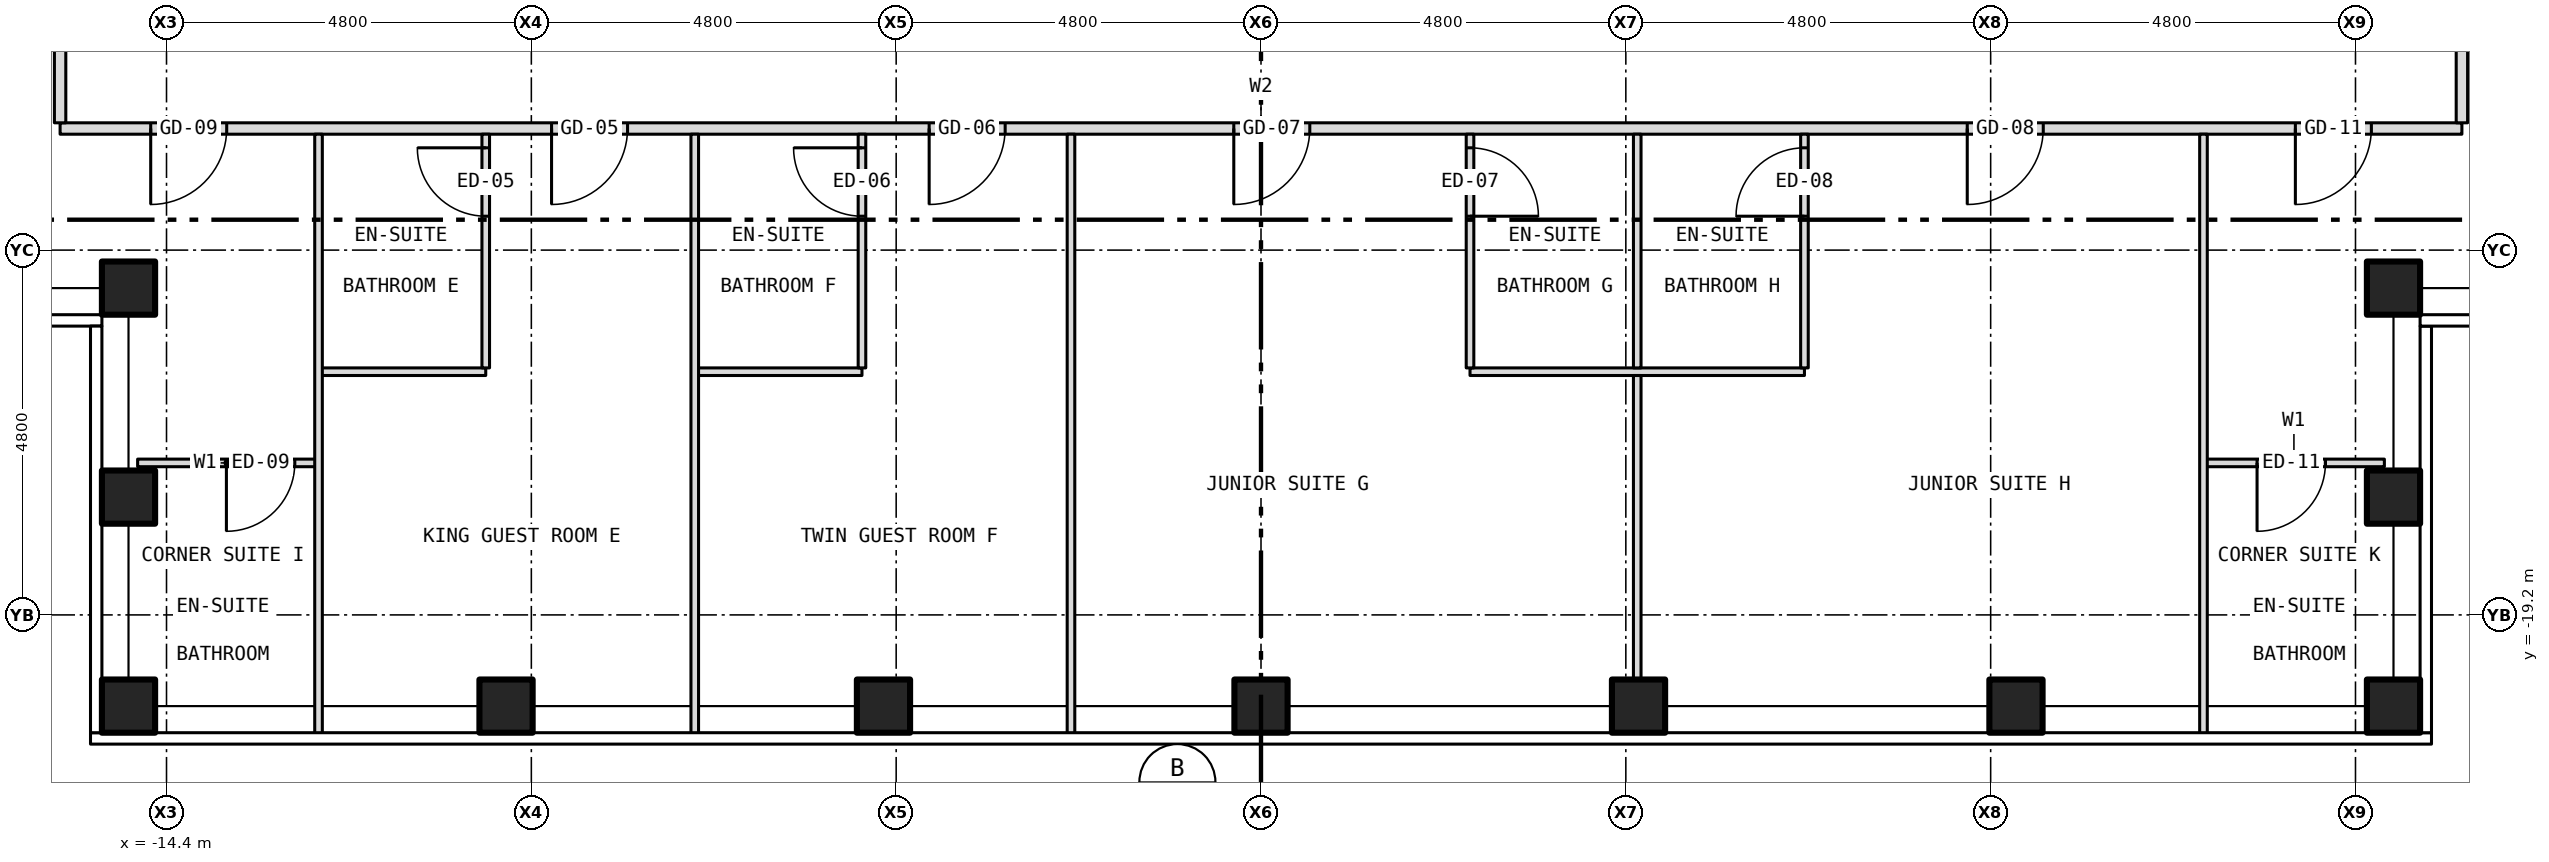
"""IFC4 building model, lengths in metres.
Left out: names, types, materials, properties, quantities, classifications, styles, units other than length and angle.
Written with IfcOpenShell. Run it as: python <this file> out.ifc"""

import sys

from ifc_helpers import new_model, si_unit, direction, frame, frame_2d, origin, origin_2d, place, context, subcontext, project, spatial, rectangle, hollow_rectangle, extrude, element, fill, save


model = new_model("IFC4")
c1 = context("Model", 3, precision=1e-05, world=origin(), true_north=direction((0.0, 1.0)))
c2 = subcontext(c1, "Body", "Model", "MODEL_VIEW")
j1 = project(units=[si_unit("LENGTHUNIT", "METRE"), si_unit("PLANEANGLEUNIT", "RADIAN")], contexts=[c1])
p1 = place(None, origin())
s1 = spatial("IfcSite", under=j1, at=p1, CompositionType="ELEMENT")
p2 = place(p1, origin())
s2 = spatial("IfcBuilding", under=s1, at=p2, CompositionType="ELEMENT")
p3 = place(p2, frame((0.0, 0.0, 201.5)))
s3 = spatial("IfcBuildingStorey", under=s2, at=p3, CompositionType="ELEMENT", Elevation=201.5)
for number, where, z_axis, x_axis in (
    (1, (-14.9, -20.4, -0.15), (0.0, 0.0, 1.0), (1.0, 0.0, 0.0)),
    (2, (-9.933, -20.4, -0.15), (0.0, 0.0, 1.0), (1.0, 0.0, 0.0)),
    (3, (-4.967, -20.4, -0.15), (0.0, 0.0, 1.0), (1.0, 0.0, 0.0)),
    (4, (0.0, -20.4, -0.15), (0.0, 0.0, 1.0), (1.0, 0.0, 0.0)),
    (5, (4.967, -20.4, -0.15), (0.0, 0.0, 1.0), (1.0, 0.0, 0.0)),
    (6, (9.933, -20.4, -0.15), (0.0, 0.0, 1.0), (1.0, 0.0, 0.0)),
    (7, (14.9, -20.4, -0.15), (0.0, 0.0, 1.0), (1.0, 0.0, 0.0)),
    (8, (-14.9, -14.9, -0.15), (0.0, 0.0, 1.0), (1.0, 0.0, 0.0)),
    (9, (-14.9, -17.65, -0.15), (0.0, 0.0, 1.0), (1.0, 0.0, 0.0)),
    (10, (14.9, -14.9, -0.15), (0.0, 0.0, 1.0), (1.0, 0.0, 0.0)),
    (11, (14.9, -17.65, -0.15), (0.0, 0.0, 1.0), (1.0, 0.0, 0.0)),
):
    element("IfcColumn", number, at=place(p3, frame(where, z_axis=z_axis, x_axis=x_axis)), inside=s3, PredefinedType="COLUMN", context=c2, shape_type="SweptSolid", body=[
        extrude(hollow_rectangle(XDim=0.7, YDim=0.7, WallThickness=0.04, at=origin_2d()), origin(), (0.0, 0.0, 1.0), 3.5),
    ])
p4 = place(p3, frame((-14.78, -17.2, 0.0), z_axis=(0.0, 0.0, 1.0), x_axis=(1.0, 0.0, 0.0)))
e12 = element("IfcWall", 12, at=p4, inside=s3, PredefinedType="PARTITIONING", context=c2, shape_type="SweptSolid", body=[
    extrude(rectangle(XDim=2.38, YDim=0.1, at=frame_2d((1.19, 0.0))), origin(), (0.0, 0.0, 1.0), 3.35),
])
p5 = place(p4, frame((1.168, 0.0, 0.0)))
e13 = element("IfcOpeningElement", 13, at=p5, cuts=e12, PredefinedType="OPENING", context=c2, shape_type="SweptSolid", body=[
    extrude(rectangle(XDim=0.9, YDim=2.1, at=frame_2d((0.45, 1.05))), frame((0.0, 0.062, 0.0), z_axis=(0.0, -1.0, 0.0), x_axis=(1.0, 0.0, 0.0)), (0.0, 0.0, 1.0), 0.124),
])
p6 = place(p3, frame((12.4, -17.2, 0.0), z_axis=(0.0, 0.0, 1.0), x_axis=(1.0, 0.0, 0.0)))
e14 = element("IfcWall", 14, at=p6, inside=s3, PredefinedType="PARTITIONING", context=c2, shape_type="SweptSolid", body=[
    extrude(rectangle(XDim=2.38, YDim=0.1, at=frame_2d((1.19, 0.0))), origin(), (0.0, 0.0, 1.0), 3.35),
])
p7 = place(p6, frame((0.705, 0.0, 0.0)))
e15 = element("IfcOpeningElement", 15, at=p7, cuts=e14, PredefinedType="OPENING", context=c2, shape_type="SweptSolid", body=[
    extrude(rectangle(XDim=0.9, YDim=2.1, at=frame_2d((0.45, 1.05))), frame((0.0, 0.062, 0.0), z_axis=(0.0, -1.0, 0.0), x_axis=(1.0, 0.0, 0.0)), (0.0, 0.0, 1.0), 0.124),
])
for number, where, z_axis, x_axis in (
    (16, (-12.4, -16.0, 0.0), (0.0, 0.0, 1.0), (1.0, 0.0, 0.0)),
    (17, (-7.45, -16.0, 0.0), (0.0, 0.0, 1.0), (1.0, 0.0, 0.0)),
):
    element("IfcWall", number, at=place(p3, frame(where, z_axis=z_axis, x_axis=x_axis)), inside=s3, PredefinedType="PARTITIONING", context=c2, shape_type="SweptSolid", body=[
        extrude(rectangle(XDim=2.2, YDim=0.1, at=frame_2d((1.1, 0.0))), origin(), (0.0, 0.0, 1.0), 3.35),
    ])
p8 = place(p3, frame((2.75, -16.0, 0.0), z_axis=(0.0, 0.0, 1.0), x_axis=(1.0, 0.0, 0.0)))
e18 = element("IfcWall", 18, at=p8, inside=s3, PredefinedType="PARTITIONING", context=c2, shape_type="SweptSolid", body=[
    extrude(rectangle(XDim=4.4, YDim=0.1, at=frame_2d((2.2, 0.0))), origin(), (0.0, 0.0, 1.0), 3.35),
])
p9 = place(p3, frame((-15.8, -12.8, 0.0), z_axis=(0.0, 0.0, 1.0), x_axis=(1.0, 0.0, 0.0)))
e19 = element("IfcWall", 19, at=p9, inside=s3, PredefinedType="PARTITIONING", context=c2, shape_type="SweptSolid", body=[
    extrude(rectangle(XDim=31.6, YDim=0.15, at=frame_2d((15.8, 0.0))), origin(), (0.0, 0.0, 1.0), 3.35),
])
p10 = place(p9, frame((6.466, 0.0, 0.0)))
e20 = element("IfcOpeningElement", 20, at=p10, cuts=e19, PredefinedType="OPENING", context=c2, shape_type="SweptSolid", body=[
    extrude(rectangle(XDim=1.0, YDim=2.1, at=frame_2d((0.5, 1.05))), frame((0.0, 0.087, 0.0), z_axis=(0.0, -1.0, 0.0), x_axis=(1.0, 0.0, 0.0)), (0.0, 0.0, 1.0), 0.174),
])
p11 = place(p9, frame((11.434, 0.0, 0.0)))
e21 = element("IfcOpeningElement", 21, at=p11, cuts=e19, PredefinedType="OPENING", context=c2, shape_type="SweptSolid", body=[
    extrude(rectangle(XDim=1.0, YDim=2.1, at=frame_2d((0.5, 1.05))), frame((0.0, 0.087, 0.0), z_axis=(0.0, -1.0, 0.0), x_axis=(1.0, 0.0, 0.0)), (0.0, 0.0, 1.0), 0.174),
])
p12 = place(p9, frame((15.442, 0.0, 0.0)))
e22 = element("IfcOpeningElement", 22, at=p12, cuts=e19, PredefinedType="OPENING", context=c2, shape_type="SweptSolid", body=[
    extrude(rectangle(XDim=1.0, YDim=2.1, at=frame_2d((0.5, 1.05))), frame((0.0, 0.087, 0.0), z_axis=(0.0, -1.0, 0.0), x_axis=(1.0, 0.0, 0.0)), (0.0, 0.0, 1.0), 0.174),
])
p13 = place(p9, frame((25.092, 0.0, 0.0)))
e23 = element("IfcOpeningElement", 23, at=p13, cuts=e19, PredefinedType="OPENING", context=c2, shape_type="SweptSolid", body=[
    extrude(rectangle(XDim=1.0, YDim=2.1, at=frame_2d((0.5, 1.05))), frame((0.0, 0.087, 0.0), z_axis=(0.0, -1.0, 0.0), x_axis=(1.0, 0.0, 0.0)), (0.0, 0.0, 1.0), 0.174),
])
p14 = place(p9, frame((1.192, 0.0, 0.0)))
e24 = element("IfcOpeningElement", 24, at=p14, cuts=e19, PredefinedType="OPENING", context=c2, shape_type="SweptSolid", body=[
    extrude(rectangle(XDim=1.0, YDim=2.1, at=frame_2d((0.5, 1.05))), frame((0.0, 0.087, 0.0), z_axis=(0.0, -1.0, 0.0), x_axis=(1.0, 0.0, 0.0)), (0.0, 0.0, 1.0), 0.174),
])
p15 = place(p9, frame((29.409, 0.0, 0.0)))
e25 = element("IfcOpeningElement", 25, at=p15, cuts=e19, PredefinedType="OPENING", context=c2, shape_type="SweptSolid", body=[
    extrude(rectangle(XDim=1.0, YDim=2.1, at=frame_2d((0.5, 1.05))), frame((0.0, 0.087, 0.0), z_axis=(0.0, -1.0, 0.0), x_axis=(1.0, 0.0, 0.0)), (0.0, 0.0, 1.0), 0.174),
])
p16 = place(p3, frame((-15.8, -12.725, 0.0), z_axis=(0.0, 0.0, 1.0), x_axis=(0.0, 1.0, 0.0)))
e26 = element("IfcWall", 26, at=p16, inside=s3, PredefinedType="PARTITIONING", context=c2, shape_type="SweptSolid", body=[
    extrude(rectangle(XDim=1.805, YDim=0.15, at=frame_2d((0.903, 0.0))), origin(), (0.0, 0.0, 1.0), 3.35),
])
p17 = place(p3, frame((-12.4, -20.78, 0.0), z_axis=(0.0, 0.0, 1.0), x_axis=(0.0, 1.0, 0.0)))
e27 = element("IfcWall", 27, at=p17, inside=s3, PredefinedType="PARTITIONING", context=c2, shape_type="SweptSolid", body=[
    extrude(rectangle(XDim=7.905, YDim=0.1, at=frame_2d((3.953, 0.0))), origin(), (0.0, 0.0, 1.0), 3.35),
])
p18 = place(p3, frame((-10.2, -15.95, 0.0), z_axis=(0.0, 0.0, 1.0), x_axis=(0.0, 1.0, 0.0)))
e28 = element("IfcWall", 28, at=p18, inside=s3, PredefinedType="PARTITIONING", context=c2, shape_type="SweptSolid", body=[
    extrude(rectangle(XDim=3.075, YDim=0.1, at=frame_2d((1.538, 0.0))), origin(), (0.0, 0.0, 1.0), 3.35),
])
p19 = place(p18, frame((1.996, 0.0, 0.0)))
e29 = element("IfcOpeningElement", 29, at=p19, cuts=e28, PredefinedType="OPENING", context=c2, shape_type="SweptSolid", body=[
    extrude(rectangle(XDim=0.9, YDim=2.1, at=frame_2d((0.45, 1.05))), frame((0.0, 0.062, 0.0), z_axis=(0.0, -1.0, 0.0), x_axis=(1.0, 0.0, 0.0)), (0.0, 0.0, 1.0), 0.124),
])
p20 = place(p3, frame((-7.45, -20.78, 0.0), z_axis=(0.0, 0.0, 1.0), x_axis=(0.0, 1.0, 0.0)))
e30 = element("IfcWall", 30, at=p20, inside=s3, PredefinedType="PARTITIONING", context=c2, shape_type="SweptSolid", body=[
    extrude(rectangle(XDim=7.905, YDim=0.1, at=frame_2d((3.953, 0.0))), origin(), (0.0, 0.0, 1.0), 3.35),
])
p21 = place(p3, frame((-5.25, -15.95, 0.0), z_axis=(0.0, 0.0, 1.0), x_axis=(0.0, 1.0, 0.0)))
e31 = element("IfcWall", 31, at=p21, inside=s3, PredefinedType="PARTITIONING", context=c2, shape_type="SweptSolid", body=[
    extrude(rectangle(XDim=3.075, YDim=0.1, at=frame_2d((1.538, 0.0))), origin(), (0.0, 0.0, 1.0), 3.35),
])
p22 = place(p21, frame((1.996, 0.0, 0.0)))
e32 = element("IfcOpeningElement", 32, at=p22, cuts=e31, PredefinedType="OPENING", context=c2, shape_type="SweptSolid", body=[
    extrude(rectangle(XDim=0.9, YDim=2.1, at=frame_2d((0.45, 1.05))), frame((0.0, 0.062, 0.0), z_axis=(0.0, -1.0, 0.0), x_axis=(1.0, 0.0, 0.0)), (0.0, 0.0, 1.0), 0.124),
])
p23 = place(p3, frame((-2.5, -20.78, 0.0), z_axis=(0.0, 0.0, 1.0), x_axis=(0.0, 1.0, 0.0)))
e33 = element("IfcWall", 33, at=p23, inside=s3, PredefinedType="PARTITIONING", context=c2, shape_type="SweptSolid", body=[
    extrude(rectangle(XDim=7.905, YDim=0.1, at=frame_2d((3.953, 0.0))), origin(), (0.0, 0.0, 1.0), 3.35),
])
p24 = place(p3, frame((2.75, -15.95, 0.0), z_axis=(0.0, 0.0, 1.0), x_axis=(0.0, 1.0, 0.0)))
e34 = element("IfcWall", 34, at=p24, inside=s3, PredefinedType="PARTITIONING", context=c2, shape_type="SweptSolid", body=[
    extrude(rectangle(XDim=3.075, YDim=0.1, at=frame_2d((1.538, 0.0))), origin(), (0.0, 0.0, 1.0), 3.35),
])
p25 = place(p24, frame((1.996, 0.0, 0.0)))
e35 = element("IfcOpeningElement", 35, at=p25, cuts=e34, PredefinedType="OPENING", context=c2, shape_type="SweptSolid", body=[
    extrude(rectangle(XDim=0.9, YDim=2.1, at=frame_2d((0.45, 1.05))), frame((0.0, 0.062, 0.0), z_axis=(0.0, -1.0, 0.0), x_axis=(1.0, 0.0, 0.0)), (0.0, 0.0, 1.0), 0.124),
])
p26 = place(p3, frame((4.95, -20.28, 0.0), z_axis=(0.0, 0.0, 1.0), x_axis=(0.0, 1.0, 0.0)))
e36 = element("IfcWall", 36, at=p26, inside=s3, PredefinedType="PARTITIONING", context=c2, shape_type="SweptSolid", body=[
    extrude(rectangle(XDim=4.23, YDim=0.1, at=frame_2d((2.115, 0.0))), origin(), (0.0, 0.0, 1.0), 2.817),
])
p27 = place(p3, frame((4.95, -15.95, 0.0), z_axis=(0.0, 0.0, 1.0), x_axis=(0.0, 1.0, 0.0)))
e37 = element("IfcWall", 37, at=p27, inside=s3, PredefinedType="PARTITIONING", context=c2, shape_type="SweptSolid", body=[
    extrude(rectangle(XDim=3.075, YDim=0.1, at=frame_2d((1.538, 0.0))), origin(), (0.0, 0.0, 1.0), 2.817),
])
p28 = place(p3, frame((7.15, -15.95, 0.0), z_axis=(0.0, 0.0, 1.0), x_axis=(0.0, 1.0, 0.0)))
e38 = element("IfcWall", 38, at=p28, inside=s3, PredefinedType="PARTITIONING", context=c2, shape_type="SweptSolid", body=[
    extrude(rectangle(XDim=3.075, YDim=0.1, at=frame_2d((1.538, 0.0))), origin(), (0.0, 0.0, 1.0), 3.35),
])
p29 = place(p28, frame((1.996, 0.0, 0.0)))
e39 = element("IfcOpeningElement", 39, at=p29, cuts=e38, PredefinedType="OPENING", context=c2, shape_type="SweptSolid", body=[
    extrude(rectangle(XDim=0.9, YDim=2.1, at=frame_2d((0.45, 1.05))), frame((0.0, 0.062, 0.0), z_axis=(0.0, -1.0, 0.0), x_axis=(1.0, 0.0, 0.0)), (0.0, 0.0, 1.0), 0.124),
])
p30 = place(p3, frame((12.4, -20.78, 0.0), z_axis=(0.0, 0.0, 1.0), x_axis=(0.0, 1.0, 0.0)))
e40 = element("IfcWall", 40, at=p30, inside=s3, PredefinedType="PARTITIONING", context=c2, shape_type="SweptSolid", body=[
    extrude(rectangle(XDim=7.905, YDim=0.1, at=frame_2d((3.953, 0.0))), origin(), (0.0, 0.0, 1.0), 3.35),
])
p31 = place(p3, frame((15.8, -12.725, 0.0), z_axis=(0.0, 0.0, 1.0), x_axis=(0.0, 1.0, 0.0)))
e41 = element("IfcWall", 41, at=p31, inside=s3, PredefinedType="PARTITIONING", context=c2, shape_type="SweptSolid", body=[
    extrude(rectangle(XDim=1.805, YDim=0.15, at=frame_2d((0.903, 0.0))), origin(), (0.0, 0.0, 1.0), 3.35),
])
p32 = place(p10, origin())
e42 = element("IfcDoor", 42, at=p32, inside=s3, OperationType="SINGLE_SWING_LEFT", PredefinedType="DOOR", context=c2, shape_type="SweptSolid", body=[
    extrude(rectangle(XDim=1.0, YDim=2.1, at=frame_2d((0.5, 1.05))), frame((0.0, 0.025, 0.0), z_axis=(0.0, -1.0, 0.0), x_axis=(1.0, 0.0, 0.0)), (0.0, 0.0, 1.0), 0.05),
])
fill(e20, e42)
p33 = place(p19, origin())
e43 = element("IfcDoor", 43, at=p33, inside=s3, OperationType="SINGLE_SWING_RIGHT", PredefinedType="DOOR", context=c2, shape_type="SweptSolid", body=[
    extrude(rectangle(XDim=0.9, YDim=2.1, at=frame_2d((0.45, 1.05))), frame((0.0, 0.025, 0.0), z_axis=(0.0, -1.0, 0.0), x_axis=(1.0, 0.0, 0.0)), (0.0, 0.0, 1.0), 0.05),
])
fill(e29, e43)
p34 = place(p11, origin())
e44 = element("IfcDoor", 44, at=p34, inside=s3, OperationType="SINGLE_SWING_LEFT", PredefinedType="DOOR", context=c2, shape_type="SweptSolid", body=[
    extrude(rectangle(XDim=1.0, YDim=2.1, at=frame_2d((0.5, 1.05))), frame((0.0, 0.025, 0.0), z_axis=(0.0, -1.0, 0.0), x_axis=(1.0, 0.0, 0.0)), (0.0, 0.0, 1.0), 0.05),
])
fill(e21, e44)
p35 = place(p22, origin())
e45 = element("IfcDoor", 45, at=p35, inside=s3, OperationType="SINGLE_SWING_RIGHT", PredefinedType="DOOR", context=c2, shape_type="SweptSolid", body=[
    extrude(rectangle(XDim=0.9, YDim=2.1, at=frame_2d((0.45, 1.05))), frame((0.0, 0.025, 0.0), z_axis=(0.0, -1.0, 0.0), x_axis=(1.0, 0.0, 0.0)), (0.0, 0.0, 1.0), 0.05),
])
fill(e32, e45)
p36 = place(p12, origin())
e46 = element("IfcDoor", 46, at=p36, inside=s3, OperationType="SINGLE_SWING_LEFT", PredefinedType="DOOR", context=c2, shape_type="SweptSolid", body=[
    extrude(rectangle(XDim=1.0, YDim=2.1, at=frame_2d((0.5, 1.05))), frame((0.0, 0.025, 0.0), z_axis=(0.0, -1.0, 0.0), x_axis=(1.0, 0.0, 0.0)), (0.0, 0.0, 1.0), 0.05),
])
fill(e22, e46)
p37 = place(p25, origin())
e47 = element("IfcDoor", 47, at=p37, inside=s3, OperationType="SINGLE_SWING_LEFT", PredefinedType="DOOR", context=c2, shape_type="SweptSolid", body=[
    extrude(rectangle(XDim=0.9, YDim=2.1, at=frame_2d((0.45, 1.05))), frame((0.0, 0.025, 0.0), z_axis=(0.0, -1.0, 0.0), x_axis=(1.0, 0.0, 0.0)), (0.0, 0.0, 1.0), 0.05),
])
fill(e35, e47)
p38 = place(p13, origin())
e48 = element("IfcDoor", 48, at=p38, inside=s3, OperationType="SINGLE_SWING_LEFT", PredefinedType="DOOR", context=c2, shape_type="SweptSolid", body=[
    extrude(rectangle(XDim=1.0, YDim=2.1, at=frame_2d((0.5, 1.05))), frame((0.0, 0.025, 0.0), z_axis=(0.0, -1.0, 0.0), x_axis=(1.0, 0.0, 0.0)), (0.0, 0.0, 1.0), 0.05),
])
fill(e23, e48)
p39 = place(p29, origin())
e49 = element("IfcDoor", 49, at=p39, inside=s3, OperationType="SINGLE_SWING_LEFT", PredefinedType="DOOR", context=c2, shape_type="SweptSolid", body=[
    extrude(rectangle(XDim=0.9, YDim=2.1, at=frame_2d((0.45, 1.05))), frame((0.0, 0.025, 0.0), z_axis=(0.0, -1.0, 0.0), x_axis=(1.0, 0.0, 0.0)), (0.0, 0.0, 1.0), 0.05),
])
fill(e39, e49)
p40 = place(p5, origin())
e50 = element("IfcDoor", 50, at=p40, inside=s3, OperationType="SINGLE_SWING_LEFT", PredefinedType="DOOR", context=c2, shape_type="SweptSolid", body=[
    extrude(rectangle(XDim=0.9, YDim=2.1, at=frame_2d((0.45, 1.05))), frame((0.0, 0.025, 0.0), z_axis=(0.0, -1.0, 0.0), x_axis=(1.0, 0.0, 0.0)), (0.0, 0.0, 1.0), 0.05),
])
fill(e13, e50)
p41 = place(p14, origin())
e51 = element("IfcDoor", 51, at=p41, inside=s3, OperationType="SINGLE_SWING_LEFT", PredefinedType="DOOR", context=c2, shape_type="SweptSolid", body=[
    extrude(rectangle(XDim=1.0, YDim=2.1, at=frame_2d((0.5, 1.05))), frame((0.0, 0.025, 0.0), z_axis=(0.0, -1.0, 0.0), x_axis=(1.0, 0.0, 0.0)), (0.0, 0.0, 1.0), 0.05),
])
fill(e24, e51)
p42 = place(p7, origin())
e52 = element("IfcDoor", 52, at=p42, inside=s3, OperationType="SINGLE_SWING_LEFT", PredefinedType="DOOR", context=c2, shape_type="SweptSolid", body=[
    extrude(rectangle(XDim=0.9, YDim=2.1, at=frame_2d((0.45, 1.05))), frame((0.0, 0.025, 0.0), z_axis=(0.0, -1.0, 0.0), x_axis=(1.0, 0.0, 0.0)), (0.0, 0.0, 1.0), 0.05),
])
fill(e15, e52)
p43 = place(p15, origin())
e53 = element("IfcDoor", 53, at=p43, inside=s3, OperationType="SINGLE_SWING_LEFT", PredefinedType="DOOR", context=c2, shape_type="SweptSolid", body=[
    extrude(rectangle(XDim=1.0, YDim=2.1, at=frame_2d((0.5, 1.05))), frame((0.0, 0.025, 0.0), z_axis=(0.0, -1.0, 0.0), x_axis=(1.0, 0.0, 0.0)), (0.0, 0.0, 1.0), 0.05),
])
fill(e25, e53)
save(model, sys.argv[1])
